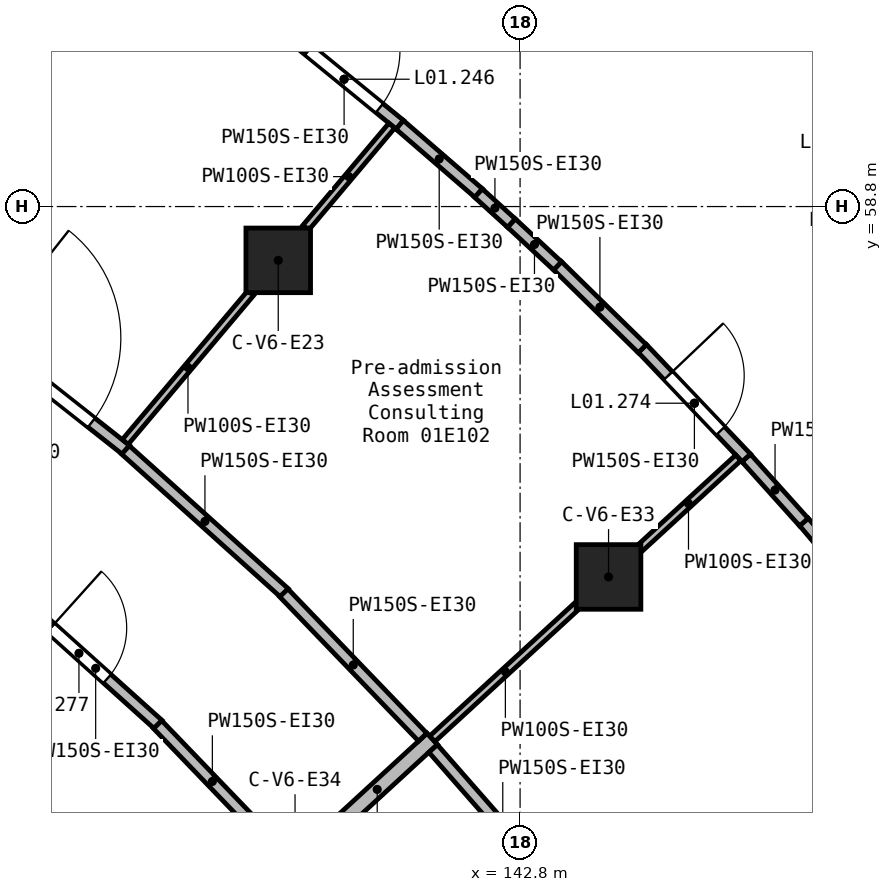
"""IFC4 building model, lengths in metres.
Left out: names, types, materials, properties, quantities, classifications, styles, units other than length and angle.
Written with IfcOpenShell. Run it as: python <this file> out.ifc"""

import sys

from ifc_helpers import new_model, si_unit, direction, frame, frame_2d, origin, origin_2d, place, context, subcontext, project, spatial, rectangle, extrude, element, fill, save


model = new_model("IFC4")
c1 = context("Model", 3, precision=1e-05, world=origin(), true_north=direction((0.0, 1.0)))
c2 = subcontext(c1, "Body", "Model", "MODEL_VIEW")
j1 = project(units=[si_unit("LENGTHUNIT", "METRE"), si_unit("PLANEANGLEUNIT", "RADIAN")], contexts=[c1])
p1 = place(None, origin())
s1 = spatial("IfcSite", under=j1, at=p1, CompositionType="ELEMENT")
p2 = place(p1, origin())
s2 = spatial("IfcBuilding", under=s1, at=p2, CompositionType="ELEMENT")
p3 = place(p2, frame((0.0, 0.0, 5.4)))
s3 = spatial("IfcBuildingStorey", under=s2, at=p3, CompositionType="ELEMENT", Elevation=5.4)
for number, where, z_axis, x_axis in (
    (1, (139.618, 58.092, 0.0), (0.0, 0.0, 1.0), (1.0, 0.0, 0.0)),
    (2, (143.964, 53.927, 0.0), (0.0, 0.0, 1.0), (1.0, 0.0, 0.0)),
):
    element("IfcColumn", number, at=place(p3, frame(where, z_axis=z_axis, x_axis=x_axis)), inside=s3, PredefinedType="COLUMN", context=c2, shape_type="SweptSolid", body=[
        extrude(rectangle(XDim=0.85, YDim=0.85, at=origin_2d()), origin(), (0.0, 0.0, 1.0), 4.5),
    ])
p4 = place(p3, frame((140.196, 50.467, 0.0), z_axis=(0.0, 0.0, 1.0), x_axis=(0.736519787736, 0.676415997943, 0.0)))
e3 = element("IfcWall", 3, at=p4, inside=s3, PredefinedType="SOLIDWALL", context=c2, shape_type="SweptSolid", body=[
    extrude(rectangle(XDim=1.966, YDim=0.2, at=frame_2d((0.983, 0.0))), origin(), (0.0, 0.0, 1.0), 4.15),
])
p5 = place(p3, frame((135.293, 57.43, 0.0), z_axis=(0.0, 0.0, 1.0), x_axis=(0.785039104315, -0.619446208073, 0.0)))
e4 = element("IfcWall", 4, at=p5, inside=s3, PredefinedType="PARTITIONING", context=c2, shape_type="SweptSolid", body=[
    extrude(rectangle(XDim=2.958, YDim=0.15, at=frame_2d((1.479, 0.0))), origin(), (0.0, 0.0, 1.0), 4.15),
])
p6 = place(p5, frame((0.579, 0.0, 0.0)))
e5 = element("IfcOpeningElement", 5, at=p6, cuts=e4, PredefinedType="OPENING", context=c2, shape_type="SweptSolid", body=[
    extrude(rectangle(XDim=1.8, YDim=2.1, at=frame_2d((0.9, 1.05))), frame((0.0, 0.085, 0.0), z_axis=(0.0, -1.0, 0.0), x_axis=(1.0, 0.0, 0.0)), (0.0, 0.0, 1.0), 0.17),
])
p7 = place(p3, frame((141.656, 51.669, 0.0), z_axis=(0.0, 0.0, 1.0), x_axis=(0.659076402407, -0.752075990702, 0.0)))
e6 = element("IfcWall", 6, at=p7, inside=s3, PredefinedType="PARTITIONING", context=c2, shape_type="SweptSolid", body=[
    extrude(rectangle(XDim=2.78, YDim=0.15, at=frame_2d((1.39, 0.0))), origin(), (0.0, 0.0, 1.0), 4.15),
])
p8 = place(p3, frame((137.608, 55.598, 0.0), z_axis=(0.0, 0.0, 1.0), x_axis=(0.743501368773, -0.668734412628, 0.0)))
e7 = element("IfcWall", 7, at=p8, inside=s3, PredefinedType="PARTITIONING", context=c2, shape_type="SweptSolid", body=[
    extrude(rectangle(XDim=2.812, YDim=0.15, at=frame_2d((1.406, 0.0))), origin(), (0.0, 0.0, 1.0), 4.15),
])
p9 = place(p3, frame((139.691, 53.718, 0.0), z_axis=(0.0, 0.0, 1.0), x_axis=(0.693447550136, -0.720507109757, 0.0)))
e8 = element("IfcWall", 8, at=p9, inside=s3, PredefinedType="PARTITIONING", context=c2, shape_type="SweptSolid", body=[
    extrude(rectangle(XDim=2.635, YDim=0.15, at=frame_2d((1.317, 0.0))), origin(), (0.0, 0.0, 1.0), 4.15),
])
p10 = place(p3, frame((136.393, 53.465, 0.0), z_axis=(0.0, 0.0, 1.0), x_axis=(0.743617683722, -0.668605070618, 0.0)))
e9 = element("IfcWall", 9, at=p10, inside=s3, PredefinedType="PARTITIONING", context=c2, shape_type="SweptSolid", body=[
    extrude(rectangle(XDim=2.213, YDim=0.15, at=frame_2d((1.106, 0.0))), origin(), (0.0, 0.0, 1.0), 4.15),
])
p11 = place(p10, frame((0.311, 0.0, 0.0)))
e10 = element("IfcOpeningElement", 10, at=p11, cuts=e9, PredefinedType="OPENING", context=c2, shape_type="SweptSolid", body=[
    extrude(rectangle(XDim=1.0, YDim=2.1, at=frame_2d((0.5, 1.05))), frame((0.0, 0.085, 0.0), z_axis=(0.0, -1.0, 0.0), x_axis=(1.0, 0.0, 0.0)), (0.0, 0.0, 1.0), 0.17),
])
p12 = place(p3, frame((138.031, 51.985, 0.0), z_axis=(0.0, 0.0, 1.0), x_axis=(0.693216793474, -0.7207291289, 0.0)))
e11 = element("IfcWall", 11, at=p12, inside=s3, PredefinedType="PARTITIONING", context=c2, shape_type="SweptSolid", body=[
    extrude(rectangle(XDim=2.076, YDim=0.15, at=frame_2d((1.038, 0.0))), origin(), (0.0, 0.0, 1.0), 4.15),
])
p13 = place(p3, frame((144.408, 56.933, 0.0), z_axis=(0.0, 0.0, 1.0), x_axis=(0.689023586461, -0.724738916646, 0.0)))
e12 = element("IfcWall", 12, at=p13, inside=s3, PredefinedType="PARTITIONING", context=c2, shape_type="SweptSolid", body=[
    extrude(rectangle(XDim=1.989, YDim=0.15, at=frame_2d((0.995, 0.0))), origin(), (0.0, 0.0, 1.0), 4.15),
])
p14 = place(p13, frame((0.494, 0.0, 0.0)))
e13 = element("IfcOpeningElement", 13, at=p14, cuts=e12, PredefinedType="OPENING", context=c2, shape_type="SweptSolid", body=[
    extrude(rectangle(XDim=1.0, YDim=2.1, at=frame_2d((0.5, 1.05))), frame((0.0, 0.085, 0.0), z_axis=(0.0, -1.0, 0.0), x_axis=(1.0, 0.0, 0.0)), (0.0, 0.0, 1.0), 0.17),
])
p15 = place(p3, frame((139.75, 61.074, 0.0), z_axis=(0.0, 0.0, 1.0), x_axis=(0.774713973469, -0.63231183708, 0.0)))
e14 = element("IfcWall", 14, at=p15, inside=s3, PredefinedType="PARTITIONING", context=c2, shape_type="SweptSolid", body=[
    extrude(rectangle(XDim=1.896, YDim=0.15, at=frame_2d((0.948, 0.0))), origin(), (0.0, 0.0, 1.0), 4.15),
])
p16 = place(p15, frame((0.348, 0.0, 0.0)))
e15 = element("IfcOpeningElement", 15, at=p16, cuts=e14, PredefinedType="OPENING", context=c2, shape_type="SweptSolid", body=[
    extrude(rectangle(XDim=1.2, YDim=2.1, at=frame_2d((0.6, 1.05))), frame((0.0, 0.085, 0.0), z_axis=(0.0, -1.0, 0.0), x_axis=(1.0, 0.0, 0.0)), (0.0, 0.0, 1.0), 0.17),
])
p17 = place(p3, frame((146.51, 61.587, 0.0), z_axis=(0.0, 0.0, 1.0), x_axis=(0.718287322607, -0.695746593367, 0.0)))
e16 = element("IfcWall", 16, at=p17, inside=s3, PredefinedType="PARTITIONING", context=c2, shape_type="SweptSolid", body=[
    extrude(rectangle(XDim=1.538, YDim=0.15, at=frame_2d((0.769, 0.0))), origin(), (0.0, 0.0, 1.0), 4.15),
])
p18 = place(p3, frame((143.292, 58.022, 0.0), z_axis=(0.0, 0.0, 1.0), x_axis=(0.714415993139, -0.699721222164, 0.0)))
e17 = element("IfcWall", 17, at=p18, inside=s3, PredefinedType="PARTITIONING", context=c2, shape_type="SweptSolid", body=[
    extrude(rectangle(XDim=1.562, YDim=0.15, at=frame_2d((0.781, 0.0))), origin(), (0.0, 0.0, 1.0), 4.15),
])
p19 = place(p3, frame((146.534, 54.651, 0.0), z_axis=(0.0, 0.0, 1.0), x_axis=(0.645184874707, -0.764026490018, 0.0)))
e18 = element("IfcWall", 18, at=p19, inside=s3, PredefinedType="PARTITIONING", context=c2, shape_type="SweptSolid", body=[
    extrude(rectangle(XDim=1.561, YDim=0.15, at=frame_2d((0.781, 0.0))), origin(), (0.0, 0.0, 1.0), 4.15),
])
p20 = place(p3, frame((141.216, 59.875, 0.0), z_axis=(0.0, 0.0, 1.0), x_axis=(0.7566031668, -0.653874336542, 0.0)))
e19 = element("IfcWall", 19, at=p20, inside=s3, PredefinedType="PARTITIONING", context=c2, shape_type="SweptSolid", body=[
    extrude(rectangle(XDim=1.374, YDim=0.15, at=frame_2d((0.687, 0.0))), origin(), (0.0, 0.0, 1.0), 4.15),
])
p21 = place(p3, frame((145.776, 55.492, 0.0), z_axis=(0.0, 0.0, 1.0), x_axis=(0.668310227337, -0.743882678946, 0.0)))
e20 = element("IfcWall", 20, at=p21, inside=s3, PredefinedType="PARTITIONING", context=c2, shape_type="SweptSolid", body=[
    extrude(rectangle(XDim=1.134, YDim=0.15, at=frame_2d((0.567, 0.0))), origin(), (0.0, 0.0, 1.0), 4.15),
])
p22 = place(p3, frame((142.686, 58.583, 0.0), z_axis=(0.0, 0.0, 1.0), x_axis=(0.732730451649, -0.680518982268, 0.0)))
e21 = element("IfcWall", 21, at=p22, inside=s3, PredefinedType="PARTITIONING", context=c2, shape_type="SweptSolid", body=[
    extrude(rectangle(XDim=0.828, YDim=0.15, at=frame_2d((0.414, 0.0))), origin(), (0.0, 0.0, 1.0), 4.15),
])
p23 = place(p3, frame((142.253, 58.977, 0.0), z_axis=(0.0, 0.0, 1.0), x_axis=(0.739127036188, -0.673566050492, 0.0)))
e22 = element("IfcWall", 22, at=p23, inside=s3, PredefinedType="PARTITIONING", context=c2, shape_type="SweptSolid", body=[
    extrude(rectangle(XDim=0.585, YDim=0.15, at=frame_2d((0.292, 0.0))), origin(), (0.0, 0.0, 1.0), 4.15),
])
p24 = place(p3, frame((141.645, 51.798, 0.0), z_axis=(0.0, 0.0, 1.0), x_axis=(0.73658314114, 0.676347008709, 0.0)))
e23 = element("IfcWall", 23, at=p24, inside=s3, PredefinedType="PARTITIONING", context=c2, shape_type="SweptSolid", body=[
    extrude(rectangle(XDim=2.61, YDim=0.1, at=frame_2d((1.305, 0.0))), origin(), (0.0, 0.0, 1.0), 4.15),
])
p25 = place(p3, frame((144.36, 54.291, 0.0), z_axis=(0.0, 0.0, 1.0), x_axis=(0.736578706187, 0.676351838611, 0.0)))
e24 = element("IfcWall", 24, at=p25, inside=s3, PredefinedType="PARTITIONING", context=c2, shape_type="SweptSolid", body=[
    extrude(rectangle(XDim=1.78, YDim=0.1, at=frame_2d((0.89, 0.0))), origin(), (0.0, 0.0, 1.0), 4.15),
])
p26 = place(p3, frame((137.605, 55.704, 0.0), z_axis=(0.0, 0.0, 1.0), x_axis=(0.644432238292, 0.764661421971, 0.0)))
e25 = element("IfcWall", 25, at=p26, inside=s3, PredefinedType="PARTITIONING", context=c2, shape_type="SweptSolid", body=[
    extrude(rectangle(XDim=2.561, YDim=0.1, at=frame_2d((1.28, 0.0))), origin(), (0.0, 0.0, 1.0), 4.15),
])
p27 = place(p3, frame((139.98, 58.522, 0.0), z_axis=(0.0, 0.0, 1.0), x_axis=(0.644495278204, 0.7646082895, 0.0)))
e26 = element("IfcWall", 26, at=p27, inside=s3, PredefinedType="PARTITIONING", context=c2, shape_type="SweptSolid", body=[
    extrude(rectangle(XDim=1.756, YDim=0.1, at=frame_2d((0.878, 0.0))), origin(), (0.0, 0.0, 1.0), 4.15),
])
p28 = place(p6, frame((1.8, 0.0, 0.0), z_axis=(0.0, 0.0, 1.0), x_axis=(-1.0, 0.0, 0.0)))
e27 = element("IfcDoor", 27, at=p28, inside=s3, OperationType="DOUBLE_DOOR_SINGLE_SWING", PredefinedType="DOOR", context=c2, shape_type="SweptSolid", body=[
    extrude(rectangle(XDim=1.8, YDim=2.1, at=frame_2d((0.9, 1.05))), frame((0.0, 0.025, 0.0), z_axis=(0.0, -1.0, 0.0), x_axis=(1.0, 0.0, 0.0)), (0.0, 0.0, 1.0), 0.05),
])
fill(e5, e27)
p29 = place(p16, origin())
e28 = element("IfcDoor", 28, at=p29, inside=s3, OperationType="SINGLE_SWING_RIGHT", PredefinedType="DOOR", context=c2, shape_type="SweptSolid", body=[
    extrude(rectangle(XDim=1.2, YDim=2.1, at=frame_2d((0.6, 1.05))), frame((0.0, 0.025, 0.0), z_axis=(0.0, -1.0, 0.0), x_axis=(1.0, 0.0, 0.0)), (0.0, 0.0, 1.0), 0.05),
])
fill(e15, e28)
p30 = place(p14, frame((1.0, 0.0, 0.0), z_axis=(0.0, 0.0, 1.0), x_axis=(-1.0, 0.0, 0.0)))
e29 = element("IfcDoor", 29, at=p30, inside=s3, OperationType="SINGLE_SWING_LEFT", PredefinedType="DOOR", context=c2, shape_type="SweptSolid", body=[
    extrude(rectangle(XDim=1.0, YDim=2.1, at=frame_2d((0.5, 1.05))), frame((0.0, 0.025, 0.0), z_axis=(0.0, -1.0, 0.0), x_axis=(1.0, 0.0, 0.0)), (0.0, 0.0, 1.0), 0.05),
])
fill(e13, e29)
p31 = place(p11, frame((1.0, 0.0, 0.0), z_axis=(0.0, 0.0, 1.0), x_axis=(-1.0, 0.0, 0.0)))
e30 = element("IfcDoor", 30, at=p31, inside=s3, OperationType="SINGLE_SWING_RIGHT", PredefinedType="DOOR", context=c2, shape_type="SweptSolid", body=[
    extrude(rectangle(XDim=1.0, YDim=2.1, at=frame_2d((0.5, 1.05))), frame((0.0, 0.025, 0.0), z_axis=(0.0, -1.0, 0.0), x_axis=(1.0, 0.0, 0.0)), (0.0, 0.0, 1.0), 0.05),
])
fill(e10, e30)
save(model, sys.argv[1])
